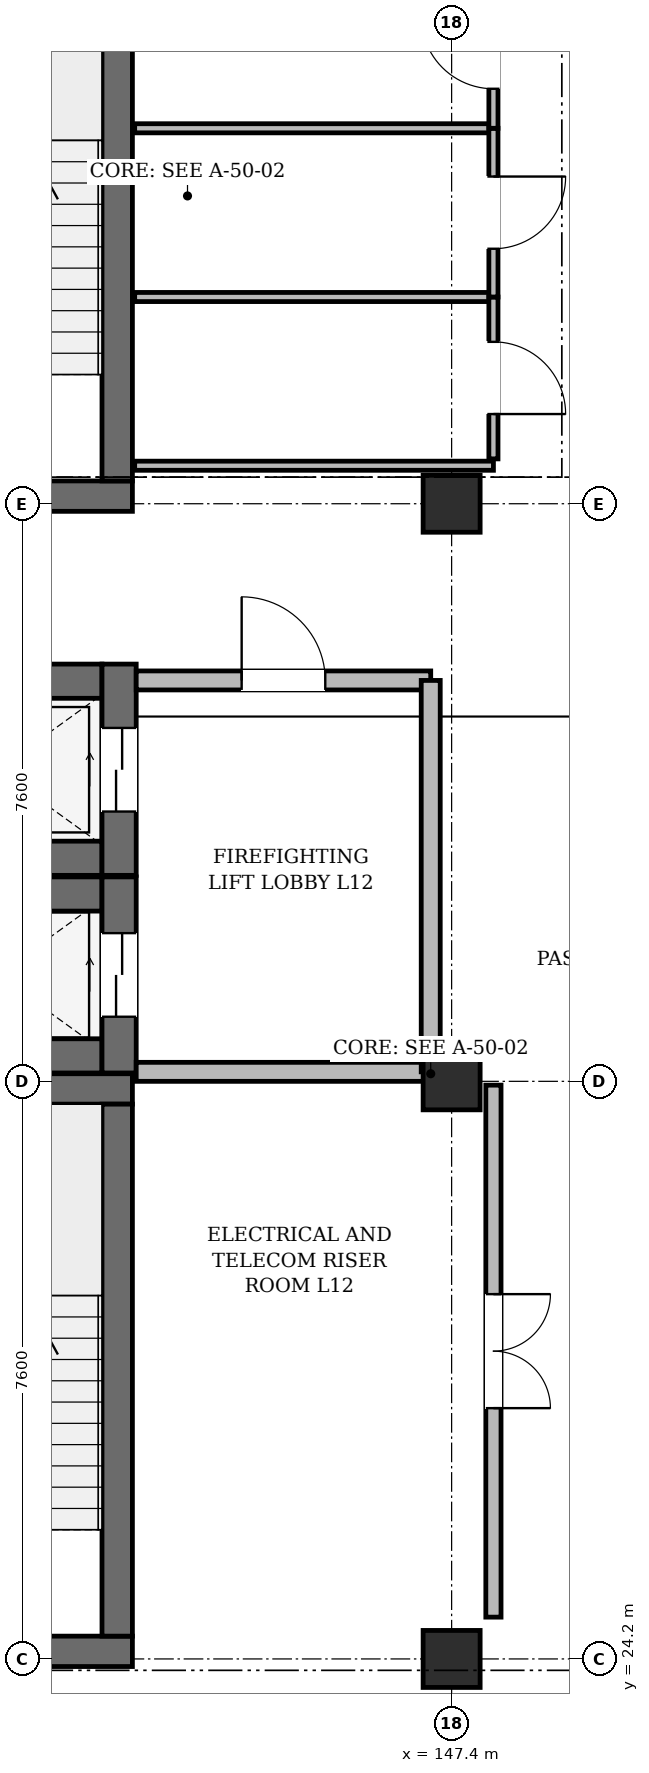
"""IFC4 building model, lengths in metres.
Left out: names, types, materials, properties, quantities, classifications, styles, units other than length and angle.
Written with IfcOpenShell. Run it as: python <this file> out.ifc"""

import sys

from ifc_helpers import new_model, si_unit, direction, frame, frame_2d, origin, origin_2d, place, context, subcontext, project, spatial, rectangle, extrude, element, fill, save


model = new_model("IFC4")
c1 = context("Model", 3, precision=1e-05, world=origin(), true_north=direction((0.0, 1.0)))
c2 = subcontext(c1, "Body", "Model", "MODEL_VIEW")
j1 = project(units=[si_unit("LENGTHUNIT", "METRE"), si_unit("PLANEANGLEUNIT", "RADIAN")], contexts=[c1])
p1 = place(None, origin())
s1 = spatial("IfcSite", under=j1, at=p1, CompositionType="ELEMENT")
p2 = place(p1, origin())
s2 = spatial("IfcBuilding", under=s1, at=p2, CompositionType="ELEMENT")
p3 = place(p2, frame((0.0, 0.0, 53.4)))
s3 = spatial("IfcBuildingStorey", under=s2, at=p3, CompositionType="ELEMENT", Elevation=53.4)
for number, where, z_axis, x_axis in (
    (1, (147.4, 24.2, 0.0), (0.0, 0.0, 1.0), (1.0, 0.0, 0.0)),
    (2, (147.4, 31.8, 0.0), (0.0, 0.0, 1.0), (1.0, 0.0, 0.0)),
    (3, (147.4, 39.4, 0.0), (0.0, 0.0, 1.0), (1.0, 0.0, 0.0)),
):
    element("IfcColumn", number, at=place(p3, frame(where, z_axis=z_axis, x_axis=x_axis)), inside=s3, PredefinedType="COLUMN", context=c2, shape_type="SweptSolid", body=[
        extrude(rectangle(XDim=0.75, YDim=0.75, at=origin_2d()), origin(), (0.0, 0.0, 1.0), 3.96),
    ])
p4 = place(p3, frame((139.4, 24.3, 0.0), z_axis=(0.0, 0.0, 1.0), x_axis=(1.0, 0.0, 0.0)))
e4 = element("IfcWall", 4, at=p4, inside=s3, PredefinedType="SHEAR", context=c2, shape_type="SweptSolid", body=[
    extrude(rectangle(XDim=3.8, YDim=0.4, at=frame_2d((1.9, 0.0))), origin(), (0.0, 0.0, 1.0), 3.96),
])
p5 = place(p4, frame((1.3, 0.0, 0.0)))
e5 = element("IfcOpeningElement", 5, at=p5, cuts=e4, PredefinedType="OPENING", context=c2, shape_type="SweptSolid", body=[
    extrude(rectangle(XDim=1.2, YDim=2.2, at=frame_2d((0.6, 1.1))), frame((0.0, 0.212, 0.0), z_axis=(0.0, -1.0, 0.0), x_axis=(1.0, 0.0, 0.0)), (0.0, 0.0, 1.0), 0.424),
])
p6 = place(p3, frame((139.4, 31.7, 0.0), z_axis=(0.0, 0.0, 1.0), x_axis=(1.0, 0.0, 0.0)))
e6 = element("IfcWall", 6, at=p6, inside=s3, PredefinedType="SHEAR", context=c2, shape_type="SweptSolid", body=[
    extrude(rectangle(XDim=3.8, YDim=0.4, at=frame_2d((1.9, 0.0))), origin(), (0.0, 0.0, 1.0), 3.96),
])
p7 = place(p3, frame((143.0, 24.5, 0.0), z_axis=(0.0, 0.0, 1.0), x_axis=(0.0, 1.0, 0.0)))
e7 = element("IfcWall", 7, at=p7, inside=s3, PredefinedType="SHEAR", context=c2, shape_type="SweptSolid", body=[
    extrude(rectangle(XDim=7.0, YDim=0.4, at=frame_2d((3.5, 0.0))), origin(), (0.0, 0.0, 1.0), 3.96),
])
p8 = place(p3, frame((139.4, 39.5, 0.0), z_axis=(0.0, 0.0, 1.0), x_axis=(1.0, 0.0, 0.0)))
e8 = element("IfcWall", 8, at=p8, inside=s3, PredefinedType="SHEAR", context=c2, shape_type="SweptSolid", body=[
    extrude(rectangle(XDim=3.8, YDim=0.4, at=frame_2d((1.9, 0.0))), origin(), (0.0, 0.0, 1.0), 3.96),
])
p9 = place(p8, frame((1.3, 0.0, 0.0)))
e9 = element("IfcOpeningElement", 9, at=p9, cuts=e8, PredefinedType="OPENING", context=c2, shape_type="SweptSolid", body=[
    extrude(rectangle(XDim=1.2, YDim=2.2, at=frame_2d((0.6, 1.1))), frame((0.0, 0.212, 0.0), z_axis=(0.0, -1.0, 0.0), x_axis=(1.0, 0.0, 0.0)), (0.0, 0.0, 1.0), 0.424),
])
p10 = place(p3, frame((143.0, 39.7, 0.0), z_axis=(0.0, 0.0, 1.0), x_axis=(0.0, 1.0, 0.0)))
e10 = element("IfcWall", 10, at=p10, inside=s3, PredefinedType="SHEAR", context=c2, shape_type="SweptSolid", body=[
    extrude(rectangle(XDim=7.0, YDim=0.4, at=frame_2d((3.5, 0.0))), origin(), (0.0, 0.0, 1.0), 3.96),
])
for number, where, z_axis, x_axis in (
    (11, (140.06, 32.135, 0.0), (0.0, 0.0, 1.0), (1.0, 0.0, 0.0)),
    (12, (140.06, 34.265, 0.0), (0.0, 0.0, 1.0), (1.0, 0.0, 0.0)),
):
    element("IfcWall", number, at=place(p3, frame(where, z_axis=z_axis, x_axis=x_axis)), inside=s3, PredefinedType="SHEAR", context=c2, shape_type="SweptSolid", body=[
        extrude(rectangle(XDim=2.74, YDim=0.45, at=frame_2d((1.37, 0.0))), origin(), (0.0, 0.0, 1.0), 3.96),
    ])
p11 = place(p3, frame((143.025, 31.91, 0.0), z_axis=(0.0, 0.0, 1.0), x_axis=(0.0, 1.0, 0.0)))
e13 = element("IfcWall", 13, at=p11, inside=s3, PredefinedType="SHEAR", context=c2, shape_type="SweptSolid", body=[
    extrude(rectangle(XDim=2.58, YDim=0.45, at=frame_2d((1.29, 0.0))), origin(), (0.0, 0.0, 1.0), 3.96),
])
p12 = place(p11, frame((0.74, 0.0, 0.0)))
e14 = element("IfcOpeningElement", 14, at=p12, cuts=e13, PredefinedType="OPENING", context=c2, shape_type="SweptSolid", body=[
    extrude(rectangle(XDim=1.1, YDim=2.2, at=frame_2d((0.55, 1.1))), frame((0.0, 0.237, 0.0), z_axis=(0.0, -1.0, 0.0), x_axis=(1.0, 0.0, 0.0)), (0.0, 0.0, 1.0), 0.474),
])
for number, where, z_axis, x_axis in (
    (15, (140.06, 34.735, 0.0), (0.0, 0.0, 1.0), (1.0, 0.0, 0.0)),
    (16, (140.06, 37.065, 0.0), (0.0, 0.0, 1.0), (1.0, 0.0, 0.0)),
):
    element("IfcWall", number, at=place(p3, frame(where, z_axis=z_axis, x_axis=x_axis)), inside=s3, PredefinedType="SHEAR", context=c2, shape_type="SweptSolid", body=[
        extrude(rectangle(XDim=2.74, YDim=0.45, at=frame_2d((1.37, 0.0))), origin(), (0.0, 0.0, 1.0), 3.96),
    ])
p13 = place(p3, frame((143.025, 34.51, 0.0), z_axis=(0.0, 0.0, 1.0), x_axis=(0.0, 1.0, 0.0)))
e17 = element("IfcWall", 17, at=p13, inside=s3, PredefinedType="SHEAR", context=c2, shape_type="SweptSolid", body=[
    extrude(rectangle(XDim=2.78, YDim=0.45, at=frame_2d((1.39, 0.0))), origin(), (0.0, 0.0, 1.0), 3.96),
])
p14 = place(p13, frame((0.84, 0.0, 0.0)))
e18 = element("IfcOpeningElement", 18, at=p14, cuts=e17, PredefinedType="OPENING", context=c2, shape_type="SweptSolid", body=[
    extrude(rectangle(XDim=1.1, YDim=2.2, at=frame_2d((0.55, 1.1))), frame((0.0, 0.237, 0.0), z_axis=(0.0, -1.0, 0.0), x_axis=(1.0, 0.0, 0.0)), (0.0, 0.0, 1.0), 0.474),
])
p15 = place(p3, frame((143.25, 37.075, 0.0), z_axis=(0.0, 0.0, 1.0), x_axis=(1.0, 0.0, 0.0)))
e19 = element("IfcWall", 19, at=p15, inside=s3, PredefinedType="SOLIDWALL", context=c2, shape_type="SweptSolid", body=[
    extrude(rectangle(XDim=3.875, YDim=0.25, at=frame_2d((1.938, 0.0))), origin(), (0.0, 0.0, 1.0), 3.805),
])
p16 = place(p15, frame((1.387, 0.0, 0.0)))
e20 = element("IfcOpeningElement", 20, at=p16, cuts=e19, PredefinedType="OPENING", context=c2, shape_type="SweptSolid", body=[
    extrude(rectangle(XDim=1.1, YDim=2.2, at=frame_2d((0.55, 1.1))), frame((0.0, 0.137, 0.0), z_axis=(0.0, -1.0, 0.0), x_axis=(1.0, 0.0, 0.0)), (0.0, 0.0, 1.0), 0.274),
])
p17 = place(p3, frame((143.25, 31.925, 0.0), z_axis=(0.0, 0.0, 1.0), x_axis=(1.0, 0.0, 0.0)))
e21 = element("IfcWall", 21, at=p17, inside=s3, PredefinedType="SOLIDWALL", context=c2, shape_type="SweptSolid", body=[
    extrude(rectangle(XDim=3.875, YDim=0.25, at=frame_2d((1.938, 0.0))), origin(), (0.0, 0.0, 1.0), 3.295),
])
p18 = place(p3, frame((147.125, 31.925, 0.0), z_axis=(0.0, 0.0, 1.0), x_axis=(0.0, 1.0, 0.0)))
e22 = element("IfcWall", 22, at=p18, inside=s3, PredefinedType="SOLIDWALL", context=c2, shape_type="SweptSolid", body=[
    extrude(rectangle(XDim=5.15, YDim=0.25, at=frame_2d((2.575, 0.0))), origin(), (0.0, 0.0, 1.0), 3.295),
])
p19 = place(p3, frame((143.23, 39.9, 0.0), z_axis=(0.0, 0.0, 1.0), x_axis=(1.0, 0.0, 0.0)))
e23 = element("IfcWall", 23, at=p19, inside=s3, PredefinedType="PARTITIONING", context=c2, shape_type="SweptSolid", body=[
    extrude(rectangle(XDim=4.72, YDim=0.12, at=frame_2d((2.36, 0.0))), origin(), (0.0, 0.0, 1.0), 3.805),
])
p20 = place(p3, frame((147.95, 31.75, 0.0), z_axis=(0.0, 0.0, 1.0), x_axis=(0.0, -1.0, 0.0)))
e24 = element("IfcWall", 24, at=p20, inside=s3, PredefinedType="PARTITIONING", context=c2, shape_type="SweptSolid", body=[
    extrude(rectangle(XDim=7.0, YDim=0.2, at=frame_2d((3.5, 0.0))), origin(), (0.0, 0.0, 1.0), 3.805),
])
p21 = place(p20, frame((2.75, 0.0, 0.0)))
e25 = element("IfcOpeningElement", 25, at=p21, cuts=e24, PredefinedType="OPENING", context=c2, shape_type="SweptSolid", body=[
    extrude(rectangle(XDim=1.5, YDim=2.2, at=frame_2d((0.75, 1.1))), frame((0.0, 0.112, 0.0), z_axis=(0.0, -1.0, 0.0), x_axis=(1.0, 0.0, 0.0)), (0.0, 0.0, 1.0), 0.224),
])
p22 = place(p3, frame((143.23, 42.12, 0.0), z_axis=(0.0, 0.0, 1.0), x_axis=(1.0, 0.0, 0.0)))
e26 = element("IfcWall", 26, at=p22, inside=s3, PredefinedType="PARTITIONING", context=c2, shape_type="SweptSolid", body=[
    extrude(rectangle(XDim=4.72, YDim=0.12, at=frame_2d((2.36, 0.0))), origin(), (0.0, 0.0, 1.0), 3.435),
])
p23 = place(p3, frame((147.95, 42.12, 0.0), z_axis=(0.0, 0.0, 1.0), x_axis=(0.0, -1.0, 0.0)))
e27 = element("IfcWall", 27, at=p23, inside=s3, PredefinedType="PARTITIONING", context=c2, shape_type="SweptSolid", body=[
    extrude(rectangle(XDim=2.13, YDim=0.12, at=frame_2d((1.065, 0.0))), origin(), (0.0, 0.0, 1.0), 3.805),
])
p24 = place(p23, frame((0.59, 0.0, 0.0)))
e28 = element("IfcOpeningElement", 28, at=p24, cuts=e27, PredefinedType="OPENING", context=c2, shape_type="SweptSolid", body=[
    extrude(rectangle(XDim=0.95, YDim=2.15, at=frame_2d((0.475, 1.075))), frame((0.0, 0.072, 0.0), z_axis=(0.0, -1.0, 0.0), x_axis=(1.0, 0.0, 0.0)), (0.0, 0.0, 1.0), 0.144),
])
p25 = place(p3, frame((143.23, 44.34, 0.0), z_axis=(0.0, 0.0, 1.0), x_axis=(1.0, 0.0, 0.0)))
e29 = element("IfcWall", 29, at=p25, inside=s3, PredefinedType="PARTITIONING", context=c2, shape_type="SweptSolid", body=[
    extrude(rectangle(XDim=4.72, YDim=0.12, at=frame_2d((2.36, 0.0))), origin(), (0.0, 0.0, 1.0), 3.385),
])
p26 = place(p3, frame((147.95, 44.34, 0.0), z_axis=(0.0, 0.0, 1.0), x_axis=(0.0, -1.0, 0.0)))
e30 = element("IfcWall", 30, at=p26, inside=s3, PredefinedType="PARTITIONING", context=c2, shape_type="SweptSolid", body=[
    extrude(rectangle(XDim=2.22, YDim=0.12, at=frame_2d((1.11, 0.0))), origin(), (0.0, 0.0, 1.0), 3.805),
])
p27 = place(p26, frame((0.635, 0.0, 0.0)))
e31 = element("IfcOpeningElement", 31, at=p27, cuts=e30, PredefinedType="OPENING", context=c2, shape_type="SweptSolid", body=[
    extrude(rectangle(XDim=0.95, YDim=2.15, at=frame_2d((0.475, 1.075))), frame((0.0, 0.072, 0.0), z_axis=(0.0, -1.0, 0.0), x_axis=(1.0, 0.0, 0.0)), (0.0, 0.0, 1.0), 0.144),
])
p28 = place(p3, frame((147.95, 46.33, 0.0), z_axis=(0.0, 0.0, 1.0), x_axis=(0.0, -1.0, 0.0)))
e32 = element("IfcWall", 32, at=p28, inside=s3, PredefinedType="PARTITIONING", context=c2, shape_type="SweptSolid", body=[
    extrude(rectangle(XDim=1.99, YDim=0.12, at=frame_2d((0.995, 0.0))), origin(), (0.0, 0.0, 1.0), 3.805),
])
p29 = place(p28, frame((0.52, 0.0, 0.0)))
e33 = element("IfcOpeningElement", 33, at=p29, cuts=e32, PredefinedType="OPENING", context=c2, shape_type="SweptSolid", body=[
    extrude(rectangle(XDim=0.95, YDim=2.15, at=frame_2d((0.475, 1.075))), frame((0.0, 0.072, 0.0), z_axis=(0.0, -1.0, 0.0), x_axis=(1.0, 0.0, 0.0)), (0.0, 0.0, 1.0), 0.144),
])
p30 = place(p12, origin())
e34 = element("IfcDoor", 34, at=p30, inside=s3, OperationType="DOUBLE_DOOR_SLIDING", PredefinedType="DOOR", context=c2, shape_type="SweptSolid", body=[
    extrude(rectangle(XDim=1.1, YDim=2.2, at=frame_2d((0.55, 1.1))), frame((0.0, 0.025, 0.0), z_axis=(0.0, -1.0, 0.0), x_axis=(1.0, 0.0, 0.0)), (0.0, 0.0, 1.0), 0.05),
])
fill(e14, e34)
p31 = place(p14, origin())
e35 = element("IfcDoor", 35, at=p31, inside=s3, OperationType="DOUBLE_DOOR_SLIDING", PredefinedType="DOOR", context=c2, shape_type="SweptSolid", body=[
    extrude(rectangle(XDim=1.1, YDim=2.2, at=frame_2d((0.55, 1.1))), frame((0.0, 0.025, 0.0), z_axis=(0.0, -1.0, 0.0), x_axis=(1.0, 0.0, 0.0)), (0.0, 0.0, 1.0), 0.05),
])
fill(e18, e35)
p32 = place(p16, origin())
e36 = element("IfcDoor", 36, at=p32, inside=s3, OperationType="SINGLE_SWING_LEFT", PredefinedType="DOOR", context=c2, shape_type="SweptSolid", body=[
    extrude(rectangle(XDim=1.1, YDim=2.2, at=frame_2d((0.55, 1.1))), frame((0.0, 0.025, 0.0), z_axis=(0.0, -1.0, 0.0), x_axis=(1.0, 0.0, 0.0)), (0.0, 0.0, 1.0), 0.05),
])
fill(e20, e36)
p33 = place(p21, origin())
e37 = element("IfcDoor", 37, at=p33, inside=s3, OperationType="DOUBLE_DOOR_SINGLE_SWING", PredefinedType="DOOR", context=c2, shape_type="SweptSolid", body=[
    extrude(rectangle(XDim=1.5, YDim=2.2, at=frame_2d((0.75, 1.1))), frame((0.0, 0.025, 0.0), z_axis=(0.0, -1.0, 0.0), x_axis=(1.0, 0.0, 0.0)), (0.0, 0.0, 1.0), 0.05),
])
fill(e25, e37)
p34 = place(p24, origin())
e38 = element("IfcDoor", 38, at=p34, inside=s3, OperationType="SINGLE_SWING_RIGHT", PredefinedType="DOOR", context=c2, shape_type="SweptSolid", body=[
    extrude(rectangle(XDim=0.95, YDim=2.15, at=frame_2d((0.475, 1.075))), frame((0.0, 0.025, 0.0), z_axis=(0.0, -1.0, 0.0), x_axis=(1.0, 0.0, 0.0)), (0.0, 0.0, 1.0), 0.05),
])
fill(e28, e38)
p35 = place(p27, origin())
e39 = element("IfcDoor", 39, at=p35, inside=s3, OperationType="SINGLE_SWING_LEFT", PredefinedType="DOOR", context=c2, shape_type="SweptSolid", body=[
    extrude(rectangle(XDim=0.95, YDim=2.15, at=frame_2d((0.475, 1.075))), frame((0.0, 0.025, 0.0), z_axis=(0.0, -1.0, 0.0), x_axis=(1.0, 0.0, 0.0)), (0.0, 0.0, 1.0), 0.05),
])
fill(e31, e39)
p36 = place(p29, frame((0.95, 0.0, 0.0), z_axis=(0.0, 0.0, 1.0), x_axis=(-1.0, 0.0, 0.0)))
e40 = element("IfcDoor", 40, at=p36, inside=s3, OperationType="SINGLE_SWING_RIGHT", PredefinedType="DOOR", context=c2, shape_type="SweptSolid", body=[
    extrude(rectangle(XDim=0.95, YDim=2.15, at=frame_2d((0.475, 1.075))), frame((0.0, 0.025, 0.0), z_axis=(0.0, -1.0, 0.0), x_axis=(1.0, 0.0, 0.0)), (0.0, 0.0, 1.0), 0.05),
])
fill(e33, e40)
save(model, sys.argv[1])
